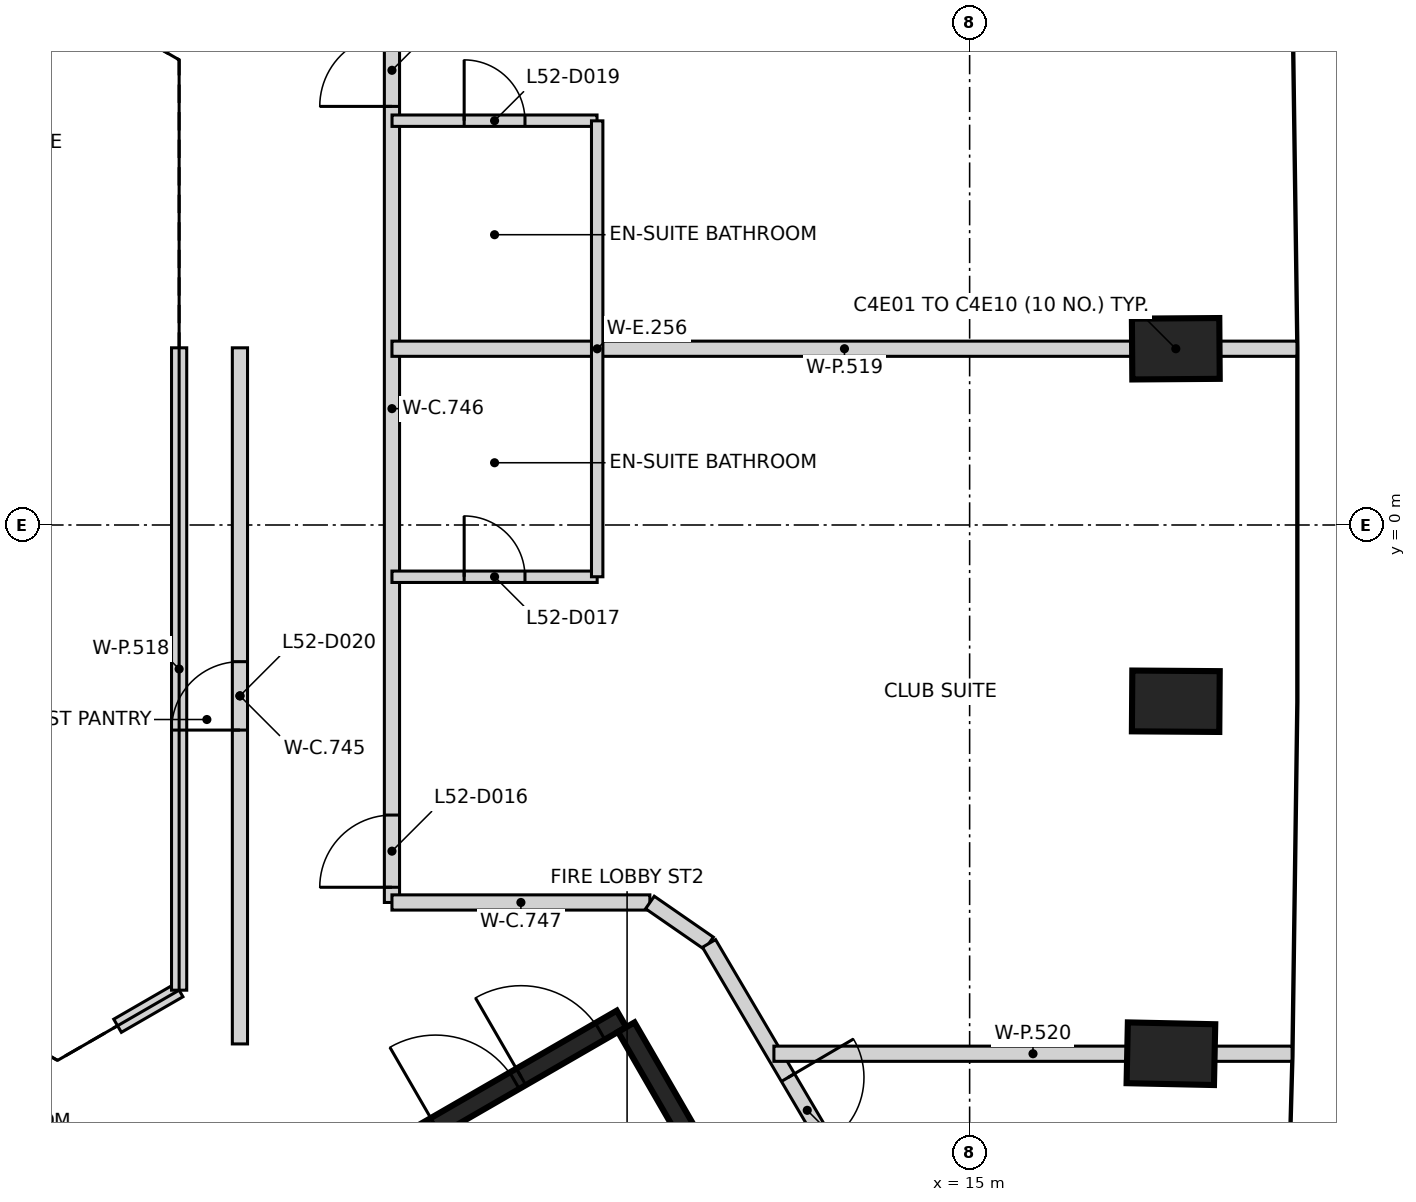
"""IFC4 building model, lengths in metres.
Left out: names, types, materials, properties, quantities, classifications, styles, units other than length and angle.
Written with IfcOpenShell. Run it as: python <this file> out.ifc"""

import sys

from ifc_helpers import new_model, si_unit, direction, frame, frame_2d, origin, origin_2d, place, context, subcontext, project, spatial, rectangle, extrude, element, fill, save


model = new_model("IFC4")
c1 = context("Model", 3, precision=1e-05, world=origin(), true_north=direction((0.0, 1.0)))
c2 = subcontext(c1, "Body", "Model", "MODEL_VIEW")
j1 = project(units=[si_unit("LENGTHUNIT", "METRE"), si_unit("PLANEANGLEUNIT", "RADIAN")], contexts=[c1])
p1 = place(None, origin())
s1 = spatial("IfcSite", under=j1, at=p1, CompositionType="ELEMENT")
p2 = place(p1, origin())
s2 = spatial("IfcBuilding", under=s1, at=p2, CompositionType="ELEMENT")
p3 = place(p2, frame((0.0, 0.0, 208.0)))
s3 = spatial("IfcBuildingStorey", under=s2, at=p3, CompositionType="ELEMENT", Elevation=208.0)
for number, where, z_axis, x_axis in (
    (1, (17.648, -6.956, -0.35), (0.0, 0.0, 1.0), (-1.0, 0.021, 0.0)),
    (2, (17.712, -2.319, -0.35), (0.0, 0.0, 1.0), (-1.0, 0.007, 0.0)),
    (3, (17.712, 2.319, -0.35), (0.0, 0.0, 1.0), (1.0, 0.007, 0.0)),
):
    element("IfcColumn", number, at=place(p3, frame(where, z_axis=z_axis, x_axis=x_axis)), inside=s3, PredefinedType="COLUMN", context=c2, shape_type="SweptSolid", body=[
        extrude(rectangle(XDim=1.15, YDim=0.8, at=origin_2d()), origin(), (0.0, 0.0, 1.0), 2.736),
    ])
p4 = place(p3, frame((0.417, -12.273, 0.0), z_axis=(0.0, 0.0, 1.0), x_axis=(0.866021906294, 0.500006057782, 0.0)))
e4 = element("IfcWall", 4, at=p4, inside=s3, PredefinedType="SHEAR", context=c2, shape_type="SweptSolid", body=[
    extrude(rectangle(XDim=11.55, YDim=0.25, at=frame_2d((5.775, 0.0))), origin(), (0.0, 0.0, 1.0), 3.2),
])
p5 = place(p4, frame((10.025, 0.0, 0.0)))
e5 = element("IfcOpeningElement", 5, at=p5, cuts=e4, PredefinedType="OPENING", context=c2, shape_type="SweptSolid", body=[
    extrude(rectangle(XDim=1.2, YDim=2.1, at=frame_2d((0.6, 1.05))), frame((0.0, 0.135, 0.0), z_axis=(0.0, -1.0, 0.0), x_axis=(1.0, 0.0, 0.0)), (0.0, 0.0, 1.0), 0.27),
])
p6 = place(p4, frame((8.725, 0.0, 0.0)))
e6 = element("IfcOpeningElement", 6, at=p6, cuts=e4, PredefinedType="OPENING", context=c2, shape_type="SweptSolid", body=[
    extrude(rectangle(XDim=1.2, YDim=2.1, at=frame_2d((0.6, 1.05))), frame((0.0, 0.135, 0.0), z_axis=(0.0, -1.0, 0.0), x_axis=(1.0, 0.0, 0.0)), (0.0, 0.0, 1.0), 0.27),
])
p7 = place(p3, frame((10.483, -6.606, 0.0), z_axis=(0.0, 0.0, 1.0), x_axis=(0.49999885962, -0.866026062182, 0.0)))
e7 = element("IfcWall", 7, at=p7, inside=s3, PredefinedType="SHEAR", context=c2, shape_type="SweptSolid", body=[
    extrude(rectangle(XDim=5.225, YDim=0.25, at=frame_2d((2.612, 0.0))), origin(), (0.0, 0.0, 1.0), 3.2),
])
p8 = place(p3, frame((-8.001, -3.926, 0.0), z_axis=(0.0, 0.0, 1.0), x_axis=(0.866131158271, -0.499816783104, 0.0)))
e8 = element("IfcWall", 8, at=p8, inside=s3, PredefinedType="PARTITIONING", context=c2, shape_type="SweptSolid", body=[
    extrude(rectangle(XDim=12.995, YDim=0.2, at=frame_2d((6.498, 0.0))), origin(), (0.0, 0.0, 1.0), 3.2),
])
p9 = place(p8, frame((6.146, 0.0, 0.0)))
e9 = element("IfcOpeningElement", 9, at=p9, cuts=e8, PredefinedType="OPENING", context=c2, shape_type="SweptSolid", body=[
    extrude(rectangle(XDim=0.95, YDim=2.1, at=frame_2d((0.475, 1.05))), frame((0.0, 0.11, 0.0), z_axis=(0.0, -1.0, 0.0), x_axis=(1.0, 0.0, 0.0)), (0.0, 0.0, 1.0), 0.22),
])
p10 = place(p8, frame((10.472, 0.0, 0.0)))
e10 = element("IfcOpeningElement", 10, at=p10, cuts=e8, PredefinedType="OPENING", context=c2, shape_type="SweptSolid", body=[
    extrude(rectangle(XDim=0.95, YDim=2.1, at=frame_2d((0.475, 1.05))), frame((0.0, 0.11, 0.0), z_axis=(0.0, -1.0, 0.0), x_axis=(1.0, 0.0, 0.0)), (0.0, 0.0, 1.0), 0.22),
])
p11 = place(p3, frame((-4.718, 3.511, 0.0), z_axis=(0.0, 0.0, 1.0), x_axis=(0.865989775611, 0.500061704731, 0.0)))
e11 = element("IfcWall", 11, at=p11, inside=s3, PredefinedType="PARTITIONING", context=c2, shape_type="SweptSolid", body=[
    extrude(rectangle(XDim=9.157, YDim=0.2, at=frame_2d((4.579, 0.0))), origin(), (0.0, 0.0, 1.0), 3.2),
])
p12 = place(p11, frame((4.128, 0.0, 0.0)))
e12 = element("IfcOpeningElement", 12, at=p12, cuts=e11, PredefinedType="OPENING", context=c2, shape_type="SweptSolid", body=[
    extrude(rectangle(XDim=0.9, YDim=2.1, at=frame_2d((0.45, 1.05))), frame((0.0, 0.11, 0.0), z_axis=(0.0, -1.0, 0.0), x_axis=(1.0, 0.0, 0.0)), (0.0, 0.0, 1.0), 0.22),
])
p13 = place(p3, frame((5.4, -6.827, 0.0), z_axis=(0.0, 0.0, 1.0), x_axis=(0.0, 1.0, 0.0)))
e13 = element("IfcWall", 13, at=p13, inside=s3, PredefinedType="PARTITIONING", context=c2, shape_type="SweptSolid", body=[
    extrude(rectangle(XDim=9.158, YDim=0.2, at=frame_2d((4.579, 0.0))), origin(), (0.0, 0.0, 1.0), 3.2),
])
p14 = place(p13, frame((4.129, 0.0, 0.0)))
e14 = element("IfcOpeningElement", 14, at=p14, cuts=e13, PredefinedType="OPENING", context=c2, shape_type="SweptSolid", body=[
    extrude(rectangle(XDim=0.9, YDim=2.1, at=frame_2d((0.45, 1.05))), frame((0.0, 0.11, 0.0), z_axis=(0.0, -1.0, 0.0), x_axis=(1.0, 0.0, 0.0)), (0.0, 0.0, 1.0), 0.22),
])
p15 = place(p3, frame((7.4, -4.966, 0.0), z_axis=(0.0, 0.0, 1.0), x_axis=(0.0, 1.0, 0.0)))
e15 = element("IfcWall", 15, at=p15, inside=s3, PredefinedType="PARTITIONING", context=c2, shape_type="SweptSolid", body=[
    extrude(rectangle(XDim=12.994, YDim=0.2, at=frame_2d((6.497, 0.0))), origin(), (0.0, 0.0, 1.0), 3.2),
])
p16 = place(p15, frame((0.2, 0.0, 0.0)))
e16 = element("IfcOpeningElement", 16, at=p16, cuts=e15, PredefinedType="OPENING", context=c2, shape_type="SweptSolid", body=[
    extrude(rectangle(XDim=0.95, YDim=2.1, at=frame_2d((0.475, 1.05))), frame((0.0, 0.11, 0.0), z_axis=(0.0, -1.0, 0.0), x_axis=(1.0, 0.0, 0.0)), (0.0, 0.0, 1.0), 0.22),
])
p17 = place(p15, frame((10.473, 0.0, 0.0)))
e17 = element("IfcOpeningElement", 17, at=p17, cuts=e15, PredefinedType="OPENING", context=c2, shape_type="SweptSolid", body=[
    extrude(rectangle(XDim=0.95, YDim=2.1, at=frame_2d((0.475, 1.05))), frame((0.0, 0.11, 0.0), z_axis=(0.0, -1.0, 0.0), x_axis=(1.0, 0.0, 0.0)), (0.0, 0.0, 1.0), 0.22),
])
p18 = place(p3, frame((7.4, -4.966, 0.0), z_axis=(0.0, 0.0, 1.0), x_axis=(1.0, 0.0, 0.0)))
e18 = element("IfcWall", 18, at=p18, inside=s3, PredefinedType="PARTITIONING", context=c2, shape_type="SweptSolid", body=[
    extrude(rectangle(XDim=3.393, YDim=0.2, at=frame_2d((1.697, 0.0))), origin(), (0.0, 0.0, 1.0), 3.2),
])
p19 = place(p3, frame((10.794, -4.966, 0.0), z_axis=(0.0, 0.0, 1.0), x_axis=(0.822266583859, -0.569102508401, 0.0)))
e19 = element("IfcWall", 19, at=p19, inside=s3, PredefinedType="PARTITIONING", context=c2, shape_type="SweptSolid", body=[
    extrude(rectangle(XDim=0.945, YDim=0.2, at=frame_2d((0.473, 0.0))), origin(), (0.0, 0.0, 1.0), 3.2),
])
p20 = place(p3, frame((11.571, -5.505, 0.0), z_axis=(0.0, 0.0, 1.0), x_axis=(0.507266536157, -0.861789220921, 0.0)))
e20 = element("IfcWall", 20, at=p20, inside=s3, PredefinedType="PARTITIONING", context=c2, shape_type="SweptSolid", body=[
    extrude(rectangle(XDim=10.391, YDim=0.2, at=frame_2d((5.195, 0.0))), origin(), (0.0, 0.0, 1.0), 3.2),
])
p21 = place(p20, frame((2.048, 0.0, 0.0)))
e21 = element("IfcOpeningElement", 21, at=p21, cuts=e20, PredefinedType="OPENING", context=c2, shape_type="SweptSolid", body=[
    extrude(rectangle(XDim=1.0, YDim=2.1, at=frame_2d((0.5, 1.05))), frame((0.0, 0.11, 0.0), z_axis=(0.0, -1.0, 0.0), x_axis=(1.0, 0.0, 0.0)), (0.0, 0.0, 1.0), 0.22),
])
p22 = place(p3, frame((-4.318, 2.819, 0.0), z_axis=(0.0, 0.0, 1.0), x_axis=(0.866038843867, 0.499976720371, 0.0)))
e22 = element("IfcWall", 22, at=p22, inside=s3, PredefinedType="PARTITIONING", context=c2, shape_type="SweptSolid", body=[
    extrude(rectangle(XDim=8.45, YDim=0.2, at=frame_2d((4.225, 0.0))), origin(), (0.0, 0.0, 1.0), 3.2),
])
p23 = place(p3, frame((3.79, -6.588, 0.0), z_axis=(0.0, 0.0, 1.0), x_axis=(0.865985641702, 0.500068863623, 0.0)))
e23 = element("IfcWall", 23, at=p23, inside=s3, PredefinedType="PARTITIONING", context=c2, shape_type="SweptSolid", body=[
    extrude(rectangle(XDim=0.935, YDim=0.2, at=frame_2d((0.468, 0.0))), origin(), (0.0, 0.0, 1.0), 3.2),
])
p24 = place(p3, frame((4.6, -6.12, 0.0), z_axis=(0.0, 0.0, 1.0), x_axis=(0.0, 1.0, 0.0)))
e24 = element("IfcWall", 24, at=p24, inside=s3, PredefinedType="PARTITIONING", context=c2, shape_type="SweptSolid", body=[
    extrude(rectangle(XDim=8.451, YDim=0.2, at=frame_2d((4.226, 0.0))), origin(), (0.0, 0.0, 1.0), 3.2),
])
p25 = place(p3, frame((7.4, 2.319, 0.0), z_axis=(0.0, 0.0, 1.0), x_axis=(1.0, 0.0, 0.0)))
e25 = element("IfcWall", 25, at=p25, inside=s3, PredefinedType="PARTITIONING", context=c2, shape_type="SweptSolid", body=[
    extrude(rectangle(XDim=11.906, YDim=0.2, at=frame_2d((5.953, 0.0))), origin(), (0.0, 0.0, 1.0), 3.2),
])
p26 = place(p3, frame((12.425, -6.956, 0.0), z_axis=(0.0, 0.0, 1.0), x_axis=(1.0, 0.0, 0.0)))
e26 = element("IfcWall", 26, at=p26, inside=s3, PredefinedType="PARTITIONING", context=c2, shape_type="SweptSolid", body=[
    extrude(rectangle(XDim=6.817, YDim=0.2, at=frame_2d((3.409, 0.0))), origin(), (0.0, 0.0, 1.0), 3.2),
])
p27 = place(p3, frame((7.4, -0.681, 0.0), z_axis=(0.0, 0.0, 1.0), x_axis=(1.0, 0.0, 0.0)))
e27 = element("IfcWall", 27, at=p27, inside=s3, PredefinedType="PARTITIONING", context=c2, shape_type="SweptSolid", body=[
    extrude(rectangle(XDim=2.7, YDim=0.15, at=frame_2d((1.35, 0.0))), origin(), (0.0, 0.0, 1.0), 3.2),
])
p28 = place(p27, frame((0.95, 0.0, 0.0)))
e28 = element("IfcOpeningElement", 28, at=p28, cuts=e27, PredefinedType="OPENING", context=c2, shape_type="SweptSolid", body=[
    extrude(rectangle(XDim=0.8, YDim=2.1, at=frame_2d((0.4, 1.05))), frame((0.0, 0.085, 0.0), z_axis=(0.0, -1.0, 0.0), x_axis=(1.0, 0.0, 0.0)), (0.0, 0.0, 1.0), 0.17),
])
p29 = place(p3, frame((7.401, 5.319, 0.0), z_axis=(0.0, 0.0, 1.0), x_axis=(1.0, 0.0, 0.0)))
e29 = element("IfcWall", 29, at=p29, inside=s3, PredefinedType="PARTITIONING", context=c2, shape_type="SweptSolid", body=[
    extrude(rectangle(XDim=2.697, YDim=0.15, at=frame_2d((1.349, 0.0))), origin(), (0.0, 0.0, 1.0), 3.2),
])
p30 = place(p29, frame((0.949, 0.0, 0.0)))
e30 = element("IfcOpeningElement", 30, at=p30, cuts=e29, PredefinedType="OPENING", context=c2, shape_type="SweptSolid", body=[
    extrude(rectangle(XDim=0.8, YDim=2.1, at=frame_2d((0.4, 1.05))), frame((0.0, 0.085, 0.0), z_axis=(0.0, -1.0, 0.0), x_axis=(1.0, 0.0, 0.0)), (0.0, 0.0, 1.0), 0.17),
])
p31 = place(p3, frame((10.1, -0.681, 0.0), z_axis=(0.0, 0.0, 1.0), x_axis=(0.0, 1.0, 0.0)))
e31 = element("IfcWall", 31, at=p31, inside=s3, PredefinedType="PARTITIONING", context=c2, shape_type="SweptSolid", body=[
    extrude(rectangle(XDim=5.998, YDim=0.15, at=frame_2d((2.999, 0.0))), origin(), (0.0, 0.0, 1.0), 3.2),
])
p32 = place(p5, origin())
e32 = element("IfcDoor", 32, at=p32, inside=s3, OperationType="SINGLE_SWING_LEFT", PredefinedType="DOOR", context=c2, shape_type="SweptSolid", body=[
    extrude(rectangle(XDim=1.2, YDim=2.1, at=frame_2d((0.6, 1.05))), frame((0.0, 0.025, 0.0), z_axis=(0.0, -1.0, 0.0), x_axis=(1.0, 0.0, 0.0)), (0.0, 0.0, 1.0), 0.05),
])
fill(e5, e32)
p33 = place(p6, origin())
e33 = element("IfcDoor", 33, at=p33, inside=s3, OperationType="SINGLE_SWING_RIGHT", PredefinedType="DOOR", context=c2, shape_type="SweptSolid", body=[
    extrude(rectangle(XDim=1.2, YDim=2.1, at=frame_2d((0.6, 1.05))), frame((0.0, 0.025, 0.0), z_axis=(0.0, -1.0, 0.0), x_axis=(1.0, 0.0, 0.0)), (0.0, 0.0, 1.0), 0.05),
])
fill(e6, e33)
p34 = place(p21, origin())
e34 = element("IfcDoor", 34, at=p34, inside=s3, OperationType="SINGLE_SWING_LEFT", PredefinedType="DOOR", context=c2, shape_type="SweptSolid", body=[
    extrude(rectangle(XDim=1.0, YDim=2.1, at=frame_2d((0.5, 1.05))), frame((0.0, 0.025, 0.0), z_axis=(0.0, -1.0, 0.0), x_axis=(1.0, 0.0, 0.0)), (0.0, 0.0, 1.0), 0.05),
])
fill(e21, e34)
p35 = place(p16, frame((0.95, 0.0, 0.0), z_axis=(0.0, 0.0, 1.0), x_axis=(-1.0, 0.0, 0.0)))
e35 = element("IfcDoor", 35, at=p35, inside=s3, OperationType="SINGLE_SWING_LEFT", PredefinedType="DOOR", context=c2, shape_type="SweptSolid", body=[
    extrude(rectangle(XDim=0.95, YDim=2.1, at=frame_2d((0.475, 1.05))), frame((0.0, 0.025, 0.0), z_axis=(0.0, -1.0, 0.0), x_axis=(1.0, 0.0, 0.0)), (0.0, 0.0, 1.0), 0.05),
])
fill(e16, e35)
p36 = place(p28, frame((0.8, 0.0, 0.0), z_axis=(0.0, 0.0, 1.0), x_axis=(-1.0, 0.0, 0.0)))
e36 = element("IfcDoor", 36, at=p36, inside=s3, OperationType="SINGLE_SWING_LEFT", PredefinedType="DOOR", context=c2, shape_type="SweptSolid", body=[
    extrude(rectangle(XDim=0.8, YDim=2.1, at=frame_2d((0.4, 1.05))), frame((0.0, 0.025, 0.0), z_axis=(0.0, -1.0, 0.0), x_axis=(1.0, 0.0, 0.0)), (0.0, 0.0, 1.0), 0.05),
])
fill(e28, e36)
p37 = place(p17, frame((0.95, 0.0, 0.0), z_axis=(0.0, 0.0, 1.0), x_axis=(-1.0, 0.0, 0.0)))
e37 = element("IfcDoor", 37, at=p37, inside=s3, OperationType="SINGLE_SWING_LEFT", PredefinedType="DOOR", context=c2, shape_type="SweptSolid", body=[
    extrude(rectangle(XDim=0.95, YDim=2.1, at=frame_2d((0.475, 1.05))), frame((0.0, 0.025, 0.0), z_axis=(0.0, -1.0, 0.0), x_axis=(1.0, 0.0, 0.0)), (0.0, 0.0, 1.0), 0.05),
])
fill(e17, e37)
p38 = place(p30, origin())
e38 = element("IfcDoor", 38, at=p38, inside=s3, OperationType="SINGLE_SWING_LEFT", PredefinedType="DOOR", context=c2, shape_type="SweptSolid", body=[
    extrude(rectangle(XDim=0.8, YDim=2.1, at=frame_2d((0.4, 1.05))), frame((0.0, 0.025, 0.0), z_axis=(0.0, -1.0, 0.0), x_axis=(1.0, 0.0, 0.0)), (0.0, 0.0, 1.0), 0.05),
])
fill(e30, e38)
p39 = place(p14, origin())
e39 = element("IfcDoor", 39, at=p39, inside=s3, OperationType="SINGLE_SWING_LEFT", PredefinedType="DOOR", context=c2, shape_type="SweptSolid", body=[
    extrude(rectangle(XDim=0.9, YDim=2.1, at=frame_2d((0.45, 1.05))), frame((0.0, 0.025, 0.0), z_axis=(0.0, -1.0, 0.0), x_axis=(1.0, 0.0, 0.0)), (0.0, 0.0, 1.0), 0.05),
])
fill(e14, e39)
save(model, sys.argv[1])
